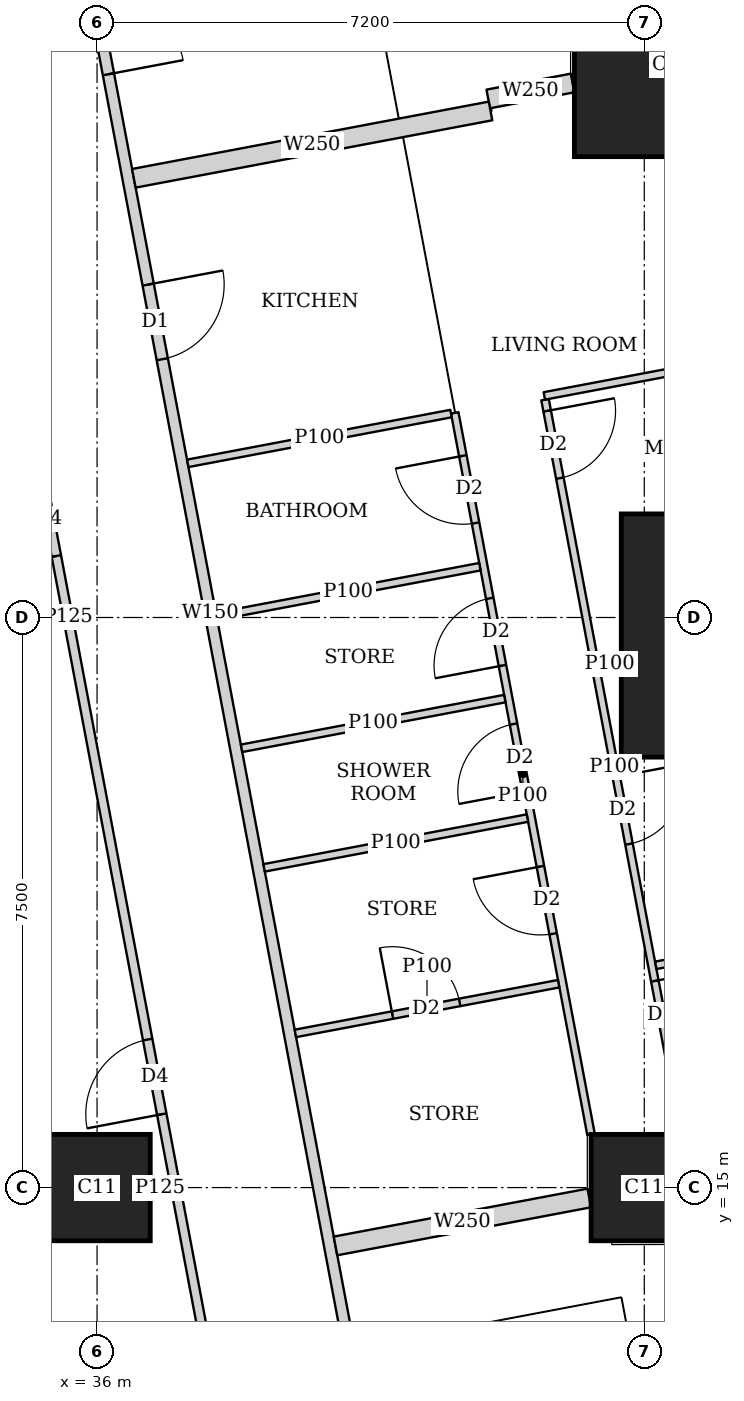
"""IFC4 building model, lengths in metres.
Left out: names, types, materials, properties, quantities, classifications, styles, units other than length and angle.
Written with IfcOpenShell. Run it as: python <this file> out.ifc"""

import sys

from ifc_helpers import new_model, si_unit, direction, frame, frame_2d, origin, origin_2d, place, context, subcontext, project, spatial, rectangle, extrude, element, fill, save


model = new_model("IFC4")
c1 = context("Model", 3, precision=1e-05, world=origin(), true_north=direction((0.0, 1.0)))
c2 = subcontext(c1, "Body", "Model", "MODEL_VIEW")
j1 = project(units=[si_unit("LENGTHUNIT", "METRE"), si_unit("PLANEANGLEUNIT", "RADIAN")], contexts=[c1])
p1 = place(None, origin())
s1 = spatial("IfcSite", under=j1, at=p1, CompositionType="ELEMENT")
p2 = place(p1, origin())
s2 = spatial("IfcBuilding", under=s1, at=p2, CompositionType="ELEMENT")
p3 = place(p2, frame((0.0, 0.0, 208.7)))
s3 = spatial("IfcBuildingStorey", under=s2, at=p3, CompositionType="ELEMENT", Elevation=208.7)
for number, where, z_axis, x_axis in (
    (1, (36.0, 15.0, 0.0), (0.0, 0.0, 1.0), (1.0, 0.0, 0.0)),
    (2, (43.2, 15.0, 0.0), (0.0, 0.0, 1.0), (1.0, 0.0, 0.0)),
):
    element("IfcColumn", number, at=place(p3, frame(where, z_axis=z_axis, x_axis=x_axis)), inside=s3, PredefinedType="COLUMN", context=c2, shape_type="SweptSolid", body=[
        extrude(rectangle(XDim=1.4, YDim=1.4, at=origin_2d()), origin(), (0.0, 0.0, 1.0), 3.75),
    ])
p4 = place(p3, frame((44.697, 22.263, 0.0), z_axis=(0.0, 0.0, 1.0), x_axis=(1.0, 0.0, 0.0)))
e3 = element("IfcColumn", 3, at=p4, inside=s3, PredefinedType="COLUMN", context=c2, shape_type="SweptSolid", body=[
    extrude(rectangle(XDim=3.6, YDim=3.2, at=origin_2d()), origin(), (0.0, 0.0, 1.0), 3.75),
])
p5 = place(p3, frame((43.48, 29.763, 0.0), z_axis=(0.0, 0.0, 1.0), x_axis=(1.0, 0.0, 0.0)))
e4 = element("IfcColumn", 4, at=p5, inside=s3, PredefinedType="COLUMN", context=c2, shape_type="SweptSolid", body=[
    extrude(rectangle(XDim=2.4, YDim=2.4, at=origin_2d()), origin(), (0.0, 0.0, 1.0), 3.75),
])
p6 = place(p3, frame((50.653, 2.703, 0.0), z_axis=(0.0, 0.0, 1.0), x_axis=(-0.185612026696, 0.982623109613, 0.0)))
e5 = element("IfcWall", 5, at=p6, inside=s3, PredefinedType="SOLIDWALL", context=c2, shape_type="SweptSolid", body=[
    extrude(rectangle(XDim=41.393, YDim=0.2, at=frame_2d((20.697, 0.0))), origin(), (0.0, 0.0, 1.0), 3.5),
])
p7 = place(p6, frame((1.633, 0.0, 0.9)))
e6 = element("IfcOpeningElement", 6, at=p7, cuts=e5, PredefinedType="OPENING", context=c2, shape_type="SweptSolid", body=[
    extrude(rectangle(XDim=1.8, YDim=1.5, at=frame_2d((0.9, 0.75))), frame((0.0, 0.11, 0.0), z_axis=(0.0, -1.0, 0.0), x_axis=(1.0, 0.0, 0.0)), (0.0, 0.0, 1.0), 0.22),
])
p8 = place(p6, frame((6.032, 0.0, 0.9)))
e7 = element("IfcOpeningElement", 7, at=p8, cuts=e5, PredefinedType="OPENING", context=c2, shape_type="SweptSolid", body=[
    extrude(rectangle(XDim=1.8, YDim=1.5, at=frame_2d((0.9, 0.75))), frame((0.0, 0.11, 0.0), z_axis=(0.0, -1.0, 0.0), x_axis=(1.0, 0.0, 0.0)), (0.0, 0.0, 1.0), 0.22),
])
p9 = place(p6, frame((9.848, 0.0, 0.9)))
e8 = element("IfcOpeningElement", 8, at=p9, cuts=e5, PredefinedType="OPENING", context=c2, shape_type="SweptSolid", body=[
    extrude(rectangle(XDim=1.8, YDim=1.5, at=frame_2d((0.9, 0.75))), frame((0.0, 0.11, 0.0), z_axis=(0.0, -1.0, 0.0), x_axis=(1.0, 0.0, 0.0)), (0.0, 0.0, 1.0), 0.22),
])
p10 = place(p6, frame((13.664, 0.0, 0.9)))
e9 = element("IfcOpeningElement", 9, at=p10, cuts=e5, PredefinedType="OPENING", context=c2, shape_type="SweptSolid", body=[
    extrude(rectangle(XDim=1.8, YDim=1.5, at=frame_2d((0.9, 0.75))), frame((0.0, 0.11, 0.0), z_axis=(0.0, -1.0, 0.0), x_axis=(1.0, 0.0, 0.0)), (0.0, 0.0, 1.0), 0.22),
])
p11 = place(p6, frame((17.481, 0.0, 0.9)))
e10 = element("IfcOpeningElement", 10, at=p11, cuts=e5, PredefinedType="OPENING", context=c2, shape_type="SweptSolid", body=[
    extrude(rectangle(XDim=1.8, YDim=1.5, at=frame_2d((0.9, 0.75))), frame((0.0, 0.11, 0.0), z_axis=(0.0, -1.0, 0.0), x_axis=(1.0, 0.0, 0.0)), (0.0, 0.0, 1.0), 0.22),
])
p12 = place(p6, frame((21.297, 0.0, 0.9)))
e11 = element("IfcOpeningElement", 11, at=p12, cuts=e5, PredefinedType="OPENING", context=c2, shape_type="SweptSolid", body=[
    extrude(rectangle(XDim=1.8, YDim=1.5, at=frame_2d((0.9, 0.75))), frame((0.0, 0.11, 0.0), z_axis=(0.0, -1.0, 0.0), x_axis=(1.0, 0.0, 0.0)), (0.0, 0.0, 1.0), 0.22),
])
p13 = place(p6, frame((25.113, 0.0, 0.9)))
e12 = element("IfcOpeningElement", 12, at=p13, cuts=e5, PredefinedType="OPENING", context=c2, shape_type="SweptSolid", body=[
    extrude(rectangle(XDim=1.8, YDim=1.5, at=frame_2d((0.9, 0.75))), frame((0.0, 0.11, 0.0), z_axis=(0.0, -1.0, 0.0), x_axis=(1.0, 0.0, 0.0)), (0.0, 0.0, 1.0), 0.22),
])
p14 = place(p6, frame((28.93, 0.0, 0.9)))
e13 = element("IfcOpeningElement", 13, at=p14, cuts=e5, PredefinedType="OPENING", context=c2, shape_type="SweptSolid", body=[
    extrude(rectangle(XDim=1.8, YDim=1.5, at=frame_2d((0.9, 0.75))), frame((0.0, 0.11, 0.0), z_axis=(0.0, -1.0, 0.0), x_axis=(1.0, 0.0, 0.0)), (0.0, 0.0, 1.0), 0.22),
])
p15 = place(p6, frame((32.746, 0.0, 0.9)))
e14 = element("IfcOpeningElement", 14, at=p15, cuts=e5, PredefinedType="OPENING", context=c2, shape_type="SweptSolid", body=[
    extrude(rectangle(XDim=1.8, YDim=1.5, at=frame_2d((0.9, 0.75))), frame((0.0, 0.11, 0.0), z_axis=(0.0, -1.0, 0.0), x_axis=(1.0, 0.0, 0.0)), (0.0, 0.0, 1.0), 0.22),
])
p16 = place(p6, frame((36.481, 0.0, 0.9)))
e15 = element("IfcOpeningElement", 15, at=p16, cuts=e5, PredefinedType="OPENING", context=c2, shape_type="SweptSolid", body=[
    extrude(rectangle(XDim=1.8, YDim=1.5, at=frame_2d((0.9, 0.75))), frame((0.0, 0.11, 0.0), z_axis=(0.0, -1.0, 0.0), x_axis=(1.0, 0.0, 0.0)), (0.0, 0.0, 1.0), 0.22),
])
p17 = place(p3, frame((33.68, 42.723, 0.0), z_axis=(0.0, 0.0, 1.0), x_axis=(0.185601160014, -0.982625162207, 0.0)))
e16 = element("IfcWall", 16, at=p17, inside=s3, PredefinedType="SOLIDWALL", context=c2, shape_type="SweptSolid", body=[
    extrude(rectangle(XDim=41.051, YDim=0.15, at=frame_2d((20.526, 0.0))), origin(), (0.0, 0.0, 1.0), 2.5),
])
p18 = place(p17, frame((12.307, 0.0, 0.0)))
e17 = element("IfcOpeningElement", 17, at=p18, cuts=e16, PredefinedType="OPENING", context=c2, shape_type="SweptSolid", body=[
    extrude(rectangle(XDim=1.0, YDim=2.1, at=frame_2d((0.5, 1.05))), frame((0.0, 0.085, 0.0), z_axis=(0.0, -1.0, 0.0), x_axis=(1.0, 0.0, 0.0)), (0.0, 0.0, 1.0), 0.17),
])
p19 = place(p17, frame((16.123, 0.0, 0.0)))
e18 = element("IfcOpeningElement", 18, at=p19, cuts=e16, PredefinedType="OPENING", context=c2, shape_type="SweptSolid", body=[
    extrude(rectangle(XDim=1.0, YDim=2.1, at=frame_2d((0.5, 1.05))), frame((0.0, 0.085, 0.0), z_axis=(0.0, -1.0, 0.0), x_axis=(1.0, 0.0, 0.0)), (0.0, 0.0, 1.0), 0.17),
])
p20 = place(p17, frame((30.902, 0.0, 0.0)))
e19 = element("IfcOpeningElement", 19, at=p20, cuts=e16, PredefinedType="OPENING", context=c2, shape_type="SweptSolid", body=[
    extrude(rectangle(XDim=1.0, YDim=2.1, at=frame_2d((0.5, 1.05))), frame((0.0, 0.085, 0.0), z_axis=(0.0, -1.0, 0.0), x_axis=(1.0, 0.0, 0.0)), (0.0, 0.0, 1.0), 0.17),
])
p21 = place(p3, frame((41.894, 25.366, 0.0), z_axis=(0.0, 0.0, 1.0), x_axis=(0.185612905165, -0.982622943675, 0.0)))
e20 = element("IfcWall", 20, at=p21, inside=s3, PredefinedType="PARTITIONING", context=c2, shape_type="SweptSolid", body=[
    extrude(rectangle(XDim=9.827, YDim=0.1, at=frame_2d((4.913, 0.0))), origin(), (0.0, 0.0, 1.0), 2.5),
])
p22 = place(p21, frame((0.151, 0.0, 0.0)))
e21 = element("IfcOpeningElement", 21, at=p22, cuts=e20, PredefinedType="OPENING", context=c2, shape_type="SweptSolid", body=[
    extrude(rectangle(XDim=0.9, YDim=2.1, at=frame_2d((0.45, 1.05))), frame((0.0, 0.06, 0.0), z_axis=(0.0, -1.0, 0.0), x_axis=(1.0, 0.0, 0.0)), (0.0, 0.0, 1.0), 0.12),
])
p23 = place(p21, frame((5.05, 0.0, 0.0)))
e22 = element("IfcOpeningElement", 22, at=p23, cuts=e20, PredefinedType="OPENING", context=c2, shape_type="SweptSolid", body=[
    extrude(rectangle(XDim=0.9, YDim=2.1, at=frame_2d((0.45, 1.05))), frame((0.0, 0.06, 0.0), z_axis=(0.0, -1.0, 0.0), x_axis=(1.0, 0.0, 0.0)), (0.0, 0.0, 1.0), 0.12),
])
p24 = place(p21, frame((7.783, 0.0, 0.0)))
e23 = element("IfcOpeningElement", 23, at=p24, cuts=e20, PredefinedType="OPENING", context=c2, shape_type="SweptSolid", body=[
    extrude(rectangle(XDim=0.9, YDim=2.1, at=frame_2d((0.45, 1.05))), frame((0.0, 0.06, 0.0), z_axis=(0.0, -1.0, 0.0), x_axis=(1.0, 0.0, 0.0)), (0.0, 0.0, 1.0), 0.12),
])
p25 = place(p3, frame((40.706, 25.192, 0.0), z_axis=(0.0, 0.0, 1.0), x_axis=(0.185629824463, -0.982619747547, 0.0)))
e24 = element("IfcWall", 24, at=p25, inside=s3, PredefinedType="PARTITIONING", context=c2, shape_type="SweptSolid", body=[
    extrude(rectangle(XDim=9.659, YDim=0.1, at=frame_2d((4.83, 0.0))), origin(), (0.0, 0.0, 1.0), 2.5),
])
p26 = place(p25, frame((0.575, 0.0, 0.0)))
e25 = element("IfcOpeningElement", 25, at=p26, cuts=e24, PredefinedType="OPENING", context=c2, shape_type="SweptSolid", body=[
    extrude(rectangle(XDim=0.9, YDim=2.1, at=frame_2d((0.45, 1.05))), frame((0.0, 0.06, 0.0), z_axis=(0.0, -1.0, 0.0), x_axis=(1.0, 0.0, 0.0)), (0.0, 0.0, 1.0), 0.12),
])
p27 = place(p25, frame((4.166, 0.0, 0.0)))
e26 = element("IfcOpeningElement", 26, at=p27, cuts=e24, PredefinedType="OPENING", context=c2, shape_type="SweptSolid", body=[
    extrude(rectangle(XDim=0.9, YDim=2.1, at=frame_2d((0.45, 1.05))), frame((0.0, 0.06, 0.0), z_axis=(0.0, -1.0, 0.0), x_axis=(1.0, 0.0, 0.0)), (0.0, 0.0, 1.0), 0.12),
])
p28 = place(p25, frame((2.483, 0.0, 0.0)))
e27 = element("IfcOpeningElement", 27, at=p28, cuts=e24, PredefinedType="OPENING", context=c2, shape_type="SweptSolid", body=[
    extrude(rectangle(XDim=0.9, YDim=2.1, at=frame_2d((0.45, 1.05))), frame((0.0, 0.06, 0.0), z_axis=(0.0, -1.0, 0.0), x_axis=(1.0, 0.0, 0.0)), (0.0, 0.0, 1.0), 0.12),
])
p29 = place(p25, frame((6.074, 0.0, 0.0)))
e28 = element("IfcOpeningElement", 28, at=p29, cuts=e24, PredefinedType="OPENING", context=c2, shape_type="SweptSolid", body=[
    extrude(rectangle(XDim=0.9, YDim=2.1, at=frame_2d((0.45, 1.05))), frame((0.0, 0.06, 0.0), z_axis=(0.0, -1.0, 0.0), x_axis=(1.0, 0.0, 0.0)), (0.0, 0.0, 1.0), 0.12),
])
p30 = place(p3, frame((46.11, 26.213, 0.0), z_axis=(0.0, 0.0, 1.0), x_axis=(-0.982633535512, -0.185556823879, 0.0)))
e29 = element("IfcWall", 29, at=p30, inside=s3, PredefinedType="PARTITIONING", context=c2, shape_type="SweptSolid", body=[
    extrude(rectangle(XDim=4.3, YDim=0.1, at=frame_2d((2.15, 0.0))), origin(), (0.0, 0.0, 1.0), 2.05),
])
p31 = place(p3, frame((42.887, 21.921, 0.0), z_axis=(0.0, 0.0, 1.0), x_axis=(-0.982688058078, -0.185267861514, 0.0)))
e30 = element("IfcWall", 30, at=p31, inside=s3, PredefinedType="PARTITIONING", context=c2, shape_type="SweptSolid", body=[
    extrude(rectangle(XDim=0.286, YDim=0.1, at=frame_2d((0.143, 0.0))), origin(), (0.0, 0.0, 1.0), 2.5),
])
p32 = place(p3, frame((47.527, 18.712, 0.0), z_axis=(0.0, 0.0, 1.0), x_axis=(-0.982665405803, -0.185387972203, 0.0)))
e31 = element("IfcWall", 31, at=p32, inside=s3, PredefinedType="PARTITIONING", context=c2, shape_type="SweptSolid", body=[
    extrude(rectangle(XDim=4.25, YDim=0.1, at=frame_2d((2.125, 0.0))), origin(), (0.0, 0.0, 1.0), 2.05),
])
p33 = place(p3, frame((40.657, 25.183, 0.0), z_axis=(0.0, 0.0, 1.0), x_axis=(-0.982585626838, -0.185810349366, 0.0)))
e32 = element("IfcWall", 32, at=p33, inside=s3, PredefinedType="PARTITIONING", context=c2, shape_type="SweptSolid", body=[
    extrude(rectangle(XDim=3.525, YDim=0.1, at=frame_2d((1.763, 0.0))), origin(), (0.0, 0.0, 1.0), 3.5),
])
p34 = place(p3, frame((41.365, 21.433, 0.0), z_axis=(0.0, 0.0, 1.0), x_axis=(-0.982638553676, -0.185530247748, 0.0)))
e33 = element("IfcWall", 33, at=p34, inside=s3, PredefinedType="PARTITIONING", context=c2, shape_type="SweptSolid", body=[
    extrude(rectangle(XDim=3.525, YDim=0.1, at=frame_2d((1.763, 0.0))), origin(), (0.0, 0.0, 1.0), 3.5),
])
p35 = place(p3, frame((42.073, 17.682, 0.0), z_axis=(0.0, 0.0, 1.0), x_axis=(-0.98265117712, -0.185463376723, 0.0)))
e34 = element("IfcWall", 34, at=p35, inside=s3, PredefinedType="PARTITIONING", context=c2, shape_type="SweptSolid", body=[
    extrude(rectangle(XDim=3.525, YDim=0.1, at=frame_2d((1.763, 0.0))), origin(), (0.0, 0.0, 1.0), 3.5),
])
p36 = place(p35, frame((1.325, 0.0, 0.0)))
e35 = element("IfcOpeningElement", 35, at=p36, cuts=e34, PredefinedType="OPENING", context=c2, shape_type="SweptSolid", body=[
    extrude(rectangle(XDim=0.9, YDim=2.1, at=frame_2d((0.45, 1.05))), frame((0.0, 0.06, 0.0), z_axis=(0.0, -1.0, 0.0), x_axis=(1.0, 0.0, 0.0)), (0.0, 0.0, 1.0), 0.12),
])
p37 = place(p3, frame((41.037, 23.168, 0.0), z_axis=(0.0, 0.0, 1.0), x_axis=(-0.982638553676, -0.185530247748, 0.0)))
e36 = element("IfcWall", 36, at=p37, inside=s3, PredefinedType="PARTITIONING", context=c2, shape_type="SweptSolid", body=[
    extrude(rectangle(XDim=3.525, YDim=0.1, at=frame_2d((1.763, 0.0))), origin(), (0.0, 0.0, 1.0), 2.5),
])
p38 = place(p3, frame((41.662, 19.861, 0.0), z_axis=(0.0, 0.0, 1.0), x_axis=(-0.982588017646, -0.185797706064, 0.0)))
e37 = element("IfcWall", 37, at=p38, inside=s3, PredefinedType="PARTITIONING", context=c2, shape_type="SweptSolid", body=[
    extrude(rectangle(XDim=3.525, YDim=0.1, at=frame_2d((1.763, 0.0))), origin(), (0.0, 0.0, 1.0), 3.5),
])
p39 = place(p3, frame((42.256, 29.532, 0.0), z_axis=(0.0, 0.0, 1.0), x_axis=(-0.982549954272, -0.185998890749, 0.0)))
e38 = element("IfcWall", 38, at=p39, inside=s3, PredefinedType="SOLIDWALL", context=c2, shape_type="SweptSolid", body=[
    extrude(rectangle(XDim=1.129, YDim=0.25, at=frame_2d((0.564, 0.0))), origin(), (0.0, 0.0, 1.0), 2.05),
])
p40 = place(p3, frame((41.177, 29.164, 0.0), z_axis=(0.0, 0.0, 1.0), x_axis=(-0.982642846239, -0.185507511263, 0.0)))
e39 = element("IfcWall", 39, at=p40, inside=s3, PredefinedType="SOLIDWALL", context=c2, shape_type="SweptSolid", body=[
    extrude(rectangle(XDim=4.776, YDim=0.25, at=frame_2d((2.388, 0.0))), origin(), (0.0, 0.0, 1.0), 2.5),
])
p41 = place(p3, frame((42.476, 14.863, 0.0), z_axis=(0.0, 0.0, 1.0), x_axis=(-0.982603567712, -0.185715450942, 0.0)))
e40 = element("IfcWall", 40, at=p41, inside=s3, PredefinedType="SOLIDWALL", context=c2, shape_type="SweptSolid", body=[
    extrude(rectangle(XDim=3.398, YDim=0.25, at=frame_2d((1.699, 0.0))), origin(), (0.0, 0.0, 1.0), 3.5),
])
p42 = place(p3, frame((37.9, 10.413, 0.0), z_axis=(0.0, 0.0, 1.0), x_axis=(-0.185589740669, 0.982627319058, 0.0)))
e41 = element("IfcWall", 41, at=p42, inside=s3, PredefinedType="PARTITIONING", context=c2, shape_type="SweptSolid", body=[
    extrude(rectangle(XDim=24.602, YDim=0.125, at=frame_2d((12.301, 0.0))), origin(), (0.0, 0.0, 1.0), 2.5),
])
p43 = place(p42, frame((0.708, 0.0, 0.0)))
e42 = element("IfcOpeningElement", 42, at=p43, cuts=e41, PredefinedType="OPENING", context=c2, shape_type="SweptSolid", body=[
    extrude(rectangle(XDim=1.0, YDim=2.1, at=frame_2d((0.5, 1.05))), frame((0.0, 0.073, 0.0), z_axis=(0.0, -1.0, 0.0), x_axis=(1.0, 0.0, 0.0)), (0.0, 0.0, 1.0), 0.145),
])
p44 = place(p42, frame((5.65, 0.0, 0.0)))
e43 = element("IfcOpeningElement", 43, at=p44, cuts=e41, PredefinedType="OPENING", context=c2, shape_type="SweptSolid", body=[
    extrude(rectangle(XDim=1.0, YDim=2.1, at=frame_2d((0.5, 1.05))), frame((0.0, 0.073, 0.0), z_axis=(0.0, -1.0, 0.0), x_axis=(1.0, 0.0, 0.0)), (0.0, 0.0, 1.0), 0.145),
])
p45 = place(p42, frame((13.124, 0.0, 0.0)))
e44 = element("IfcOpeningElement", 44, at=p45, cuts=e41, PredefinedType="OPENING", context=c2, shape_type="SweptSolid", body=[
    extrude(rectangle(XDim=1.0, YDim=2.1, at=frame_2d((0.5, 1.05))), frame((0.0, 0.073, 0.0), z_axis=(0.0, -1.0, 0.0), x_axis=(1.0, 0.0, 0.0)), (0.0, 0.0, 1.0), 0.145),
])
p46 = place(p42, frame((16.94, 0.0, 0.0)))
e45 = element("IfcOpeningElement", 45, at=p46, cuts=e41, PredefinedType="OPENING", context=c2, shape_type="SweptSolid", body=[
    extrude(rectangle(XDim=1.0, YDim=2.1, at=frame_2d((0.5, 1.05))), frame((0.0, 0.073, 0.0), z_axis=(0.0, -1.0, 0.0), x_axis=(1.0, 0.0, 0.0)), (0.0, 0.0, 1.0), 0.145),
])
p47 = place(p42, frame((20.9, 0.0, 0.0)))
e46 = element("IfcOpeningElement", 46, at=p47, cuts=e41, PredefinedType="OPENING", context=c2, shape_type="SweptSolid", body=[
    extrude(rectangle(XDim=1.0, YDim=2.1, at=frame_2d((0.5, 1.05))), frame((0.0, 0.073, 0.0), z_axis=(0.0, -1.0, 0.0), x_axis=(1.0, 0.0, 0.0)), (0.0, 0.0, 1.0), 0.145),
])
p48 = place(p3, frame((36.701, 15.0, 0.0), z_axis=(0.0, 0.0, 1.0), x_axis=(1.0, 0.0, 0.0)))
e47 = element("IfcWall", 47, at=p48, inside=s3, PredefinedType="PARTITIONING", context=c2, shape_type="SweptSolid", body=[
    extrude(rectangle(XDim=0.257, YDim=0.125, at=frame_2d((0.128, 0.0))), origin(), (0.0, 0.0, 1.0), 3.5),
])
p49 = place(p3, frame((33.701, 22.5, 0.0), z_axis=(0.0, 0.0, 1.0), x_axis=(1.0, 0.0, 0.0)))
e48 = element("IfcWall", 48, at=p49, inside=s3, PredefinedType="PARTITIONING", context=c2, shape_type="SweptSolid", body=[
    extrude(rectangle(XDim=1.841, YDim=0.125, at=frame_2d((0.92, 0.0))), origin(), (0.0, 0.0, 1.0), 2.5),
])
p50 = place(p18, origin())
e49 = element("IfcDoor", 49, at=p50, inside=s3, OperationType="SINGLE_SWING_RIGHT", PredefinedType="DOOR", context=c2, shape_type="SweptSolid", body=[
    extrude(rectangle(XDim=1.0, YDim=2.1, at=frame_2d((0.5, 1.05))), frame((0.0, 0.025, 0.0), z_axis=(0.0, -1.0, 0.0), x_axis=(1.0, 0.0, 0.0)), (0.0, 0.0, 1.0), 0.05),
])
fill(e17, e49)
p51 = place(p22, origin())
e50 = element("IfcDoor", 50, at=p51, inside=s3, OperationType="SINGLE_SWING_LEFT", PredefinedType="DOOR", context=c2, shape_type="SweptSolid", body=[
    extrude(rectangle(XDim=0.9, YDim=2.1, at=frame_2d((0.45, 1.05))), frame((0.0, 0.025, 0.0), z_axis=(0.0, -1.0, 0.0), x_axis=(1.0, 0.0, 0.0)), (0.0, 0.0, 1.0), 0.05),
])
fill(e21, e50)
p52 = place(p23, origin())
e51 = element("IfcDoor", 51, at=p52, inside=s3, OperationType="SINGLE_SWING_LEFT", PredefinedType="DOOR", context=c2, shape_type="SweptSolid", body=[
    extrude(rectangle(XDim=0.9, YDim=2.1, at=frame_2d((0.45, 1.05))), frame((0.0, 0.025, 0.0), z_axis=(0.0, -1.0, 0.0), x_axis=(1.0, 0.0, 0.0)), (0.0, 0.0, 1.0), 0.05),
])
fill(e22, e51)
p53 = place(p24, origin())
e52 = element("IfcDoor", 52, at=p53, inside=s3, OperationType="SINGLE_SWING_LEFT", PredefinedType="DOOR", context=c2, shape_type="SweptSolid", body=[
    extrude(rectangle(XDim=0.9, YDim=2.1, at=frame_2d((0.45, 1.05))), frame((0.0, 0.025, 0.0), z_axis=(0.0, -1.0, 0.0), x_axis=(1.0, 0.0, 0.0)), (0.0, 0.0, 1.0), 0.05),
])
fill(e23, e52)
p54 = place(p26, origin())
e53 = element("IfcDoor", 53, at=p54, inside=s3, OperationType="SINGLE_SWING_RIGHT", PredefinedType="DOOR", context=c2, shape_type="SweptSolid", body=[
    extrude(rectangle(XDim=0.9, YDim=2.1, at=frame_2d((0.45, 1.05))), frame((0.0, 0.025, 0.0), z_axis=(0.0, -1.0, 0.0), x_axis=(1.0, 0.0, 0.0)), (0.0, 0.0, 1.0), 0.05),
])
fill(e25, e53)
p55 = place(p27, origin())
e54 = element("IfcDoor", 54, at=p55, inside=s3, OperationType="SINGLE_SWING_LEFT", PredefinedType="DOOR", context=c2, shape_type="SweptSolid", body=[
    extrude(rectangle(XDim=0.9, YDim=2.1, at=frame_2d((0.45, 1.05))), frame((0.0, 0.025, 0.0), z_axis=(0.0, -1.0, 0.0), x_axis=(1.0, 0.0, 0.0)), (0.0, 0.0, 1.0), 0.05),
])
fill(e26, e54)
p56 = place(p28, origin())
e55 = element("IfcDoor", 55, at=p56, inside=s3, OperationType="SINGLE_SWING_LEFT", PredefinedType="DOOR", context=c2, shape_type="SweptSolid", body=[
    extrude(rectangle(XDim=0.9, YDim=2.1, at=frame_2d((0.45, 1.05))), frame((0.0, 0.025, 0.0), z_axis=(0.0, -1.0, 0.0), x_axis=(1.0, 0.0, 0.0)), (0.0, 0.0, 1.0), 0.05),
])
fill(e27, e55)
p57 = place(p29, origin())
e56 = element("IfcDoor", 56, at=p57, inside=s3, OperationType="SINGLE_SWING_RIGHT", PredefinedType="DOOR", context=c2, shape_type="SweptSolid", body=[
    extrude(rectangle(XDim=0.9, YDim=2.1, at=frame_2d((0.45, 1.05))), frame((0.0, 0.025, 0.0), z_axis=(0.0, -1.0, 0.0), x_axis=(1.0, 0.0, 0.0)), (0.0, 0.0, 1.0), 0.05),
])
fill(e28, e56)
p58 = place(p19, origin())
e57 = element("IfcDoor", 57, at=p58, inside=s3, OperationType="SINGLE_SWING_LEFT", PredefinedType="DOOR", context=c2, shape_type="SweptSolid", body=[
    extrude(rectangle(XDim=1.0, YDim=2.1, at=frame_2d((0.5, 1.05))), frame((0.0, 0.025, 0.0), z_axis=(0.0, -1.0, 0.0), x_axis=(1.0, 0.0, 0.0)), (0.0, 0.0, 1.0), 0.05),
])
fill(e18, e57)
p59 = place(p36, origin())
e58 = element("IfcDoor", 58, at=p59, inside=s3, OperationType="SINGLE_SWING_LEFT", PredefinedType="DOOR", context=c2, shape_type="SweptSolid", body=[
    extrude(rectangle(XDim=0.9, YDim=2.1, at=frame_2d((0.45, 1.05))), frame((0.0, 0.025, 0.0), z_axis=(0.0, -1.0, 0.0), x_axis=(1.0, 0.0, 0.0)), (0.0, 0.0, 1.0), 0.05),
])
fill(e35, e58)
p60 = place(p44, origin())
e59 = element("IfcDoor", 59, at=p60, inside=s3, OperationType="SINGLE_SWING_LEFT", PredefinedType="DOOR", context=c2, shape_type="SweptSolid", body=[
    extrude(rectangle(XDim=1.0, YDim=2.1, at=frame_2d((0.5, 1.05))), frame((0.0, 0.025, 0.0), z_axis=(0.0, -1.0, 0.0), x_axis=(1.0, 0.0, 0.0)), (0.0, 0.0, 1.0), 0.05),
])
fill(e43, e59)
p61 = place(p45, origin())
e60 = element("IfcDoor", 60, at=p61, inside=s3, OperationType="SINGLE_SWING_LEFT", PredefinedType="DOOR", context=c2, shape_type="SweptSolid", body=[
    extrude(rectangle(XDim=1.0, YDim=2.1, at=frame_2d((0.5, 1.05))), frame((0.0, 0.025, 0.0), z_axis=(0.0, -1.0, 0.0), x_axis=(1.0, 0.0, 0.0)), (0.0, 0.0, 1.0), 0.05),
])
fill(e44, e60)
save(model, sys.argv[1])
